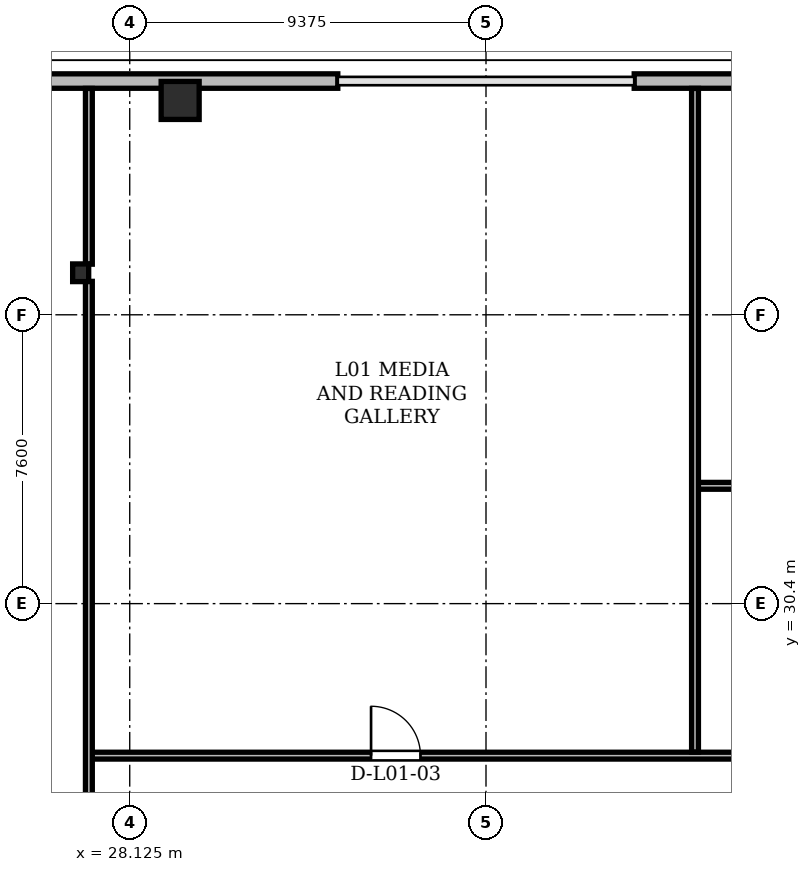
"""IFC4 building model, lengths in metres.
Left out: names, types, materials, properties, quantities, classifications, styles, units other than length and angle.
Written with IfcOpenShell. Run it as: python <this file> out.ifc"""

import sys

from ifc_helpers import new_model, si_unit, direction, frame, frame_2d, origin, origin_2d, place, context, subcontext, project, spatial, rectangle, hollow_rectangle, i_section, extrude, element, fill, save


model = new_model("IFC4")
c1 = context("Model", 3, precision=1e-05, world=origin(), true_north=direction((0.0, 1.0)))
c2 = subcontext(c1, "Body", "Model", "MODEL_VIEW")
j1 = project(units=[si_unit("LENGTHUNIT", "METRE"), si_unit("PLANEANGLEUNIT", "RADIAN")], contexts=[c1])
p1 = place(None, origin())
s1 = spatial("IfcSite", under=j1, at=p1, CompositionType="ELEMENT")
p2 = place(p1, origin())
s2 = spatial("IfcBuilding", under=s1, at=p2, CompositionType="ELEMENT")
p3 = place(p2, frame((0.0, 0.0, 5.4)))
s3 = spatial("IfcBuildingStorey", under=s2, at=p3, CompositionType="ELEMENT", Elevation=5.4)
p4 = place(p3, frame((29.452, 43.64, 0.005), z_axis=(0.0, 0.0, 1.0), x_axis=(1.0, 0.0, 0.0)))
e1 = element("IfcColumn", 1, at=p4, inside=s3, PredefinedType="COLUMN", context=c2, shape_type="SweptSolid", body=[
    extrude(hollow_rectangle(XDim=1.0, YDim=1.0, WallThickness=0.085, at=origin_2d()), origin(), (0.0, 0.0, 1.0), 4.491),
])
p5 = place(p3, frame((26.834, 39.106, 0.005), z_axis=(0.0, 0.0, 1.0), x_axis=(1.0, 0.0, 0.0)))
e2 = element("IfcColumn", 2, at=p5, inside=s3, PredefinedType="COLUMN", context=c2, shape_type="SweptSolid", body=[
    extrude(i_section(OverallWidth=0.422, OverallDepth=0.465, WebThickness=0.045, FlangeThickness=0.072, at=origin_2d()), origin(), (0.0, 0.0, 1.0), 4.491),
])
p6 = place(p3, frame((76.072, 44.15, 0.0), z_axis=(0.0, 0.0, 1.0), x_axis=(-1.0, 0.0, 0.0)))
e3 = element("IfcWall", 3, at=p6, inside=s3, PredefinedType="SOLIDWALL", context=c2, shape_type="SweptSolid", body=[
    extrude(rectangle(XDim=34.672, YDim=0.38, at=frame_2d((17.336, 0.0))), origin(), (0.0, 0.0, 1.0), 4.22),
])
p7 = place(p6, frame((8.208, 0.0, 0.85)))
e4 = element("IfcOpeningElement", 4, at=p7, cuts=e3, PredefinedType="OPENING", context=c2, shape_type="SweptSolid", body=[
    extrude(rectangle(XDim=3.0, YDim=2.25, at=frame_2d((1.5, 1.125))), frame((0.0, 0.19, 0.0), z_axis=(0.0, -1.0, 0.0), x_axis=(1.0, 0.0, 0.0)), (0.0, 0.0, 1.0), 0.38),
])
p8 = place(p6, frame((23.464, 0.0, 0.85)))
e5 = element("IfcOpeningElement", 5, at=p8, cuts=e3, PredefinedType="OPENING", context=c2, shape_type="SweptSolid", body=[
    extrude(rectangle(XDim=3.0, YDim=2.25, at=frame_2d((1.5, 1.125))), frame((0.0, 0.19, 0.0), z_axis=(0.0, -1.0, 0.0), x_axis=(1.0, 0.0, 0.0)), (0.0, 0.0, 1.0), 0.38),
])
p9 = place(p3, frame((33.6, 44.15, 0.0), z_axis=(0.0, 0.0, 1.0), x_axis=(-1.0, 0.0, 0.0)))
e6 = element("IfcWall", 6, at=p9, inside=s3, PredefinedType="SOLIDWALL", context=c2, shape_type="SweptSolid", body=[
    extrude(rectangle(XDim=34.672, YDim=0.38, at=frame_2d((17.336, 0.0))), origin(), (0.0, 0.0, 1.0), 4.22),
])
p10 = place(p9, frame((8.208, 0.0, 0.85)))
e7 = element("IfcOpeningElement", 7, at=p10, cuts=e6, PredefinedType="OPENING", context=c2, shape_type="SweptSolid", body=[
    extrude(rectangle(XDim=3.0, YDim=2.25, at=frame_2d((1.5, 1.125))), frame((0.0, 0.19, 0.0), z_axis=(0.0, -1.0, 0.0), x_axis=(1.0, 0.0, 0.0)), (0.0, 0.0, 1.0), 0.38),
])
p11 = place(p9, frame((23.464, 0.0, 0.85)))
e8 = element("IfcOpeningElement", 8, at=p11, cuts=e6, PredefinedType="OPENING", context=c2, shape_type="SweptSolid", body=[
    extrude(rectangle(XDim=3.0, YDim=2.25, at=frame_2d((1.5, 1.125))), frame((0.0, 0.19, 0.0), z_axis=(0.0, -1.0, 0.0), x_axis=(1.0, 0.0, 0.0)), (0.0, 0.0, 1.0), 0.38),
])
p12 = place(p3, frame((27.05, 26.4, 0.0), z_axis=(0.0, 0.0, 1.0), x_axis=(1.0, 0.0, 0.0)))
e9 = element("IfcWall", 9, at=p12, inside=s3, PredefinedType="PARTITIONING", context=c2, shape_type="SweptSolid", body=[
    extrude(rectangle(XDim=28.55, YDim=0.18, at=frame_2d((14.275, 0.0))), origin(), (0.0, 0.0, 1.0), 3.283),
])
p13 = place(p12, frame((7.425, 0.0, 0.0)))
e10 = element("IfcOpeningElement", 10, at=p13, cuts=e9, PredefinedType="OPENING", context=c2, shape_type="SweptSolid", body=[
    extrude(rectangle(XDim=1.3, YDim=2.2, at=frame_2d((0.65, 1.1))), frame((0.0, 0.09, 0.0), z_axis=(0.0, -1.0, 0.0), x_axis=(1.0, 0.0, 0.0)), (0.0, 0.0, 1.0), 0.18),
])
p14 = place(p12, frame((18.437, 0.0, 0.0)))
e11 = element("IfcOpeningElement", 11, at=p14, cuts=e9, PredefinedType="OPENING", context=c2, shape_type="SweptSolid", body=[
    extrude(rectangle(XDim=0.88, YDim=2.08, at=frame_2d((0.44, 1.04))), frame((0.0, 0.09, 0.0), z_axis=(0.0, -1.0, 0.0), x_axis=(1.0, 0.0, 0.0)), (0.0, 0.0, 1.0), 0.18),
])
p15 = place(p12, frame((23.736, 0.0, 0.0)))
e12 = element("IfcOpeningElement", 12, at=p15, cuts=e9, PredefinedType="OPENING", context=c2, shape_type="SweptSolid", body=[
    extrude(rectangle(XDim=0.88, YDim=2.08, at=frame_2d((0.44, 1.04))), frame((0.0, 0.09, 0.0), z_axis=(0.0, -1.0, 0.0), x_axis=(1.0, 0.0, 0.0)), (0.0, 0.0, 1.0), 0.18),
])
p16 = place(p3, frame((43.0, 33.5, 0.0), z_axis=(0.0, 0.0, 1.0), x_axis=(1.0, 0.0, 0.0)))
e13 = element("IfcWall", 13, at=p16, inside=s3, PredefinedType="PARTITIONING", context=c2, shape_type="SweptSolid", body=[
    extrude(rectangle(XDim=6.0, YDim=0.18, at=frame_2d((3.0, 0.0))), origin(), (0.0, 0.0, 1.0), 3.283),
])
p17 = place(p3, frame((27.05, 10.494, 0.0), z_axis=(0.0, 0.0, 1.0), x_axis=(0.0, 1.0, 0.0)))
e14 = element("IfcWall", 14, at=p17, inside=s3, PredefinedType="PARTITIONING", context=c2, shape_type="SweptSolid", body=[
    extrude(rectangle(XDim=28.386, YDim=0.18, at=frame_2d((14.193, 0.0))), origin(), (0.0, 0.0, 1.0), 3.283),
])
p18 = place(p17, frame((5.985, 0.0, 0.0)))
e15 = element("IfcOpeningElement", 15, at=p18, cuts=e14, PredefinedType="OPENING", context=c2, shape_type="SweptSolid", body=[
    extrude(rectangle(XDim=1.3, YDim=2.2, at=frame_2d((0.65, 1.1))), frame((0.0, 0.09, 0.0), z_axis=(0.0, -1.0, 0.0), x_axis=(1.0, 0.0, 0.0)), (0.0, 0.0, 1.0), 0.18),
])
p19 = place(p3, frame((27.05, 39.332, 0.0), z_axis=(0.0, 0.0, 1.0), x_axis=(0.0, 1.0, 0.0)))
e16 = element("IfcWall", 16, at=p19, inside=s3, PredefinedType="PARTITIONING", context=c2, shape_type="SweptSolid", body=[
    extrude(rectangle(XDim=4.625, YDim=0.18, at=frame_2d((2.312, 0.0))), origin(), (0.0, 0.0, 1.0), 3.354),
])
p20 = place(p3, frame((43.0, 26.494, 0.0), z_axis=(0.0, 0.0, 1.0), x_axis=(0.0, 1.0, 0.0)))
e17 = element("IfcWall", 17, at=p20, inside=s3, PredefinedType="PARTITIONING", context=c2, shape_type="SweptSolid", body=[
    extrude(rectangle(XDim=17.462, YDim=0.18, at=frame_2d((8.731, 0.0))), origin(), (0.0, 0.0, 1.0), 3.354),
])
p21 = place(p13, origin())
e18 = element("IfcDoor", 18, at=p21, inside=s3, OperationType="SINGLE_SWING_LEFT", PredefinedType="DOOR", context=c2, shape_type="SweptSolid", body=[
    extrude(rectangle(XDim=1.3, YDim=2.2, at=frame_2d((0.65, 1.1))), frame((0.0, 0.025, 0.0), z_axis=(0.0, -1.0, 0.0), x_axis=(1.0, 0.0, 0.0)), (0.0, 0.0, 1.0), 0.05),
])
fill(e10, e18)
save(model, sys.argv[1])
